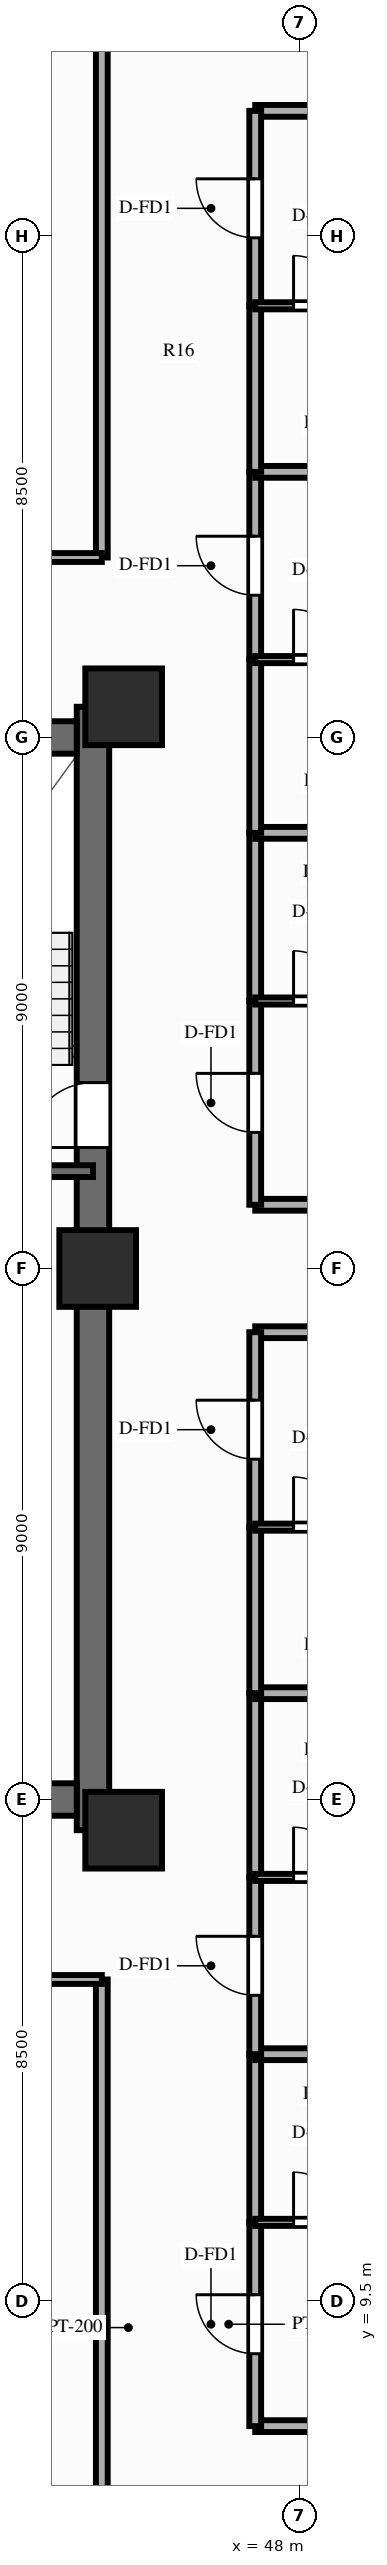
"""IFC4 building model, lengths in metres.
Left out: names, types, materials, properties, quantities, classifications, styles, units other than length and angle.
Written with IfcOpenShell. Run it as: python <this file> out.ifc"""

import sys

from ifc_helpers import new_model, si_unit, direction, frame, frame_2d, origin, origin_2d, place, context, subcontext, project, spatial, rectangle, extrude, source, transform, mapped, element, fill, save


model = new_model("IFC4")
c1 = context("Model", 3, precision=1e-05, world=origin(), true_north=direction((0.0, 1.0)))
c2 = subcontext(c1, "Body", "Model", "MODEL_VIEW")
j1 = project(units=[si_unit("LENGTHUNIT", "METRE"), si_unit("PLANEANGLEUNIT", "RADIAN")], contexts=[c1])
p1 = place(None, origin())
s1 = spatial("IfcSite", under=j1, at=p1, CompositionType="ELEMENT")
p2 = place(p1, origin())
s2 = spatial("IfcBuilding", under=s1, at=p2, CompositionType="ELEMENT")
p3 = place(p2, frame((0.0, 0.0, 92.85)))
s3 = spatial("IfcBuildingStorey", under=s2, at=p3, CompositionType="ELEMENT", Elevation=92.85)
p4 = place(p3, frame((44.5, 17.48, 0.0), z_axis=(0.0, 0.0, 1.0), x_axis=(0.0, 1.0, 0.0)))
e1 = element("IfcWall", 1, at=p4, inside=s3, PredefinedType="SHEAR", context=c2, shape_type="SweptSolid", body=[
    extrude(rectangle(XDim=19.04, YDim=0.55, at=frame_2d((9.52, 0.0))), origin(), (0.0, 0.0, 1.0), 3.0),
])
p5 = place(p4, frame((12.67, 0.0, 0.0), z_axis=(0.0, 0.0, 1.0), x_axis=(-1.0, 0.0, 0.0)))
e2 = element("IfcOpeningElement", 2, at=p5, cuts=e1, PredefinedType="OPENING", context=c2, shape_type="SweptSolid", body=[
    extrude(rectangle(XDim=1.1, YDim=2.15, at=frame_2d((0.55, 1.075))), frame((0.0, 0.287, 0.0), z_axis=(0.0, -1.0, 0.0), x_axis=(1.0, 0.0, 0.0)), (0.0, 0.0, 1.0), 0.574),
])
p6 = place(p3, frame((31.775, 18.0, 0.0), z_axis=(0.0, 0.0, 1.0), x_axis=(1.0, 0.0, 0.0)))
e3 = element("IfcWall", 3, at=p6, inside=s3, PredefinedType="SHEAR", context=c2, shape_type="SweptSolid", body=[
    extrude(rectangle(XDim=12.45, YDim=0.55, at=frame_2d((6.225, 0.0))), origin(), (0.0, 0.0, 1.0), 3.0),
])
p7 = place(p3, frame((31.775, 36.0, 0.0), z_axis=(0.0, 0.0, 1.0), x_axis=(1.0, 0.0, 0.0)))
e4 = element("IfcWall", 4, at=p7, inside=s3, PredefinedType="SHEAR", context=c2, shape_type="SweptSolid", body=[
    extrude(rectangle(XDim=12.45, YDim=0.55, at=frame_2d((6.225, 0.0))), origin(), (0.0, 0.0, 1.0), 3.0),
])
p8 = place(p7, frame((5.175, 0.0, 0.0), z_axis=(0.0, 0.0, 1.0), x_axis=(-1.0, 0.0, 0.0)))
e5 = element("IfcOpeningElement", 5, at=p8, cuts=e4, PredefinedType="OPENING", context=c2, shape_type="SweptSolid", body=[
    extrude(rectangle(XDim=1.4, YDim=2.15, at=frame_2d((0.7, 1.075))), frame((0.0, 0.287, 0.0), z_axis=(0.0, -1.0, 0.0), x_axis=(1.0, 0.0, 0.0)), (0.0, 0.0, 1.0), 0.574),
])
m1 = source(origin(), c2, "Body", "SweptSolid", [
    extrude(rectangle(XDim=1.3, YDim=1.3, at=origin_2d()), origin(), (0.0, 0.0, 1.0), 3.0),
])
for number, where, z_axis, x_axis in (
    (6, (45.02, 17.48, 0.0), (0.0, 0.0, 1.0), (1.0, 0.0, 0.0)),
    (7, (45.02, 36.52, 0.0), (0.0, 0.0, 1.0), (1.0, 0.0, 0.0)),
    (8, (44.58, 27.0, 0.0), (0.0, 0.0, 1.0), (1.0, 0.0, 0.0)),
):
    element("IfcColumn", number, at=place(p3, frame(where, z_axis=z_axis, x_axis=x_axis)), inside=s3, PredefinedType="COLUMN", context=c2, shape_type="MappedRepresentation", body=[
        mapped(m1, transform((0.0, 0.0, 0.0), scale=1.0)),
    ])
p9 = place(p3, frame((40.57, 28.65, 0.0), z_axis=(0.0, 0.0, 1.0), x_axis=(1.0, 0.0, 0.0)))
e9 = element("IfcWall", 9, at=p9, inside=s3, PredefinedType="SOLIDWALL", context=c2, shape_type="SweptSolid", body=[
    extrude(rectangle(XDim=3.93, YDim=0.2, at=frame_2d((1.965, 0.0))), origin(), (0.0, 0.0, 1.0), 2.79),
])
p10 = place(p3, frame((44.65, 14.95, 0.0), z_axis=(0.0, 0.0, 1.0), x_axis=(0.0, -1.0, 0.0)))
e10 = element("IfcWall", 10, at=p10, inside=s3, PredefinedType="PARTITIONING", context=c2, shape_type="SweptSolid", body=[
    extrude(rectangle(XDim=11.8, YDim=0.2, at=frame_2d((5.9, 0.0))), origin(), (0.0, 0.0, 1.0), 2.34),
])
p11 = place(p3, frame((36.25, 14.95, 0.0), z_axis=(0.0, 0.0, 1.0), x_axis=(1.0, 0.0, 0.0)))
e11 = element("IfcWall", 11, at=p11, inside=s3, PredefinedType="PARTITIONING", context=c2, shape_type="SweptSolid", body=[
    extrude(rectangle(XDim=8.4, YDim=0.15, at=frame_2d((4.2, 0.0))), origin(), (0.0, 0.0, 1.0), 2.79),
])
p12 = place(p11, frame((3.367, 0.0, 0.0)))
e12 = element("IfcOpeningElement", 12, at=p12, cuts=e11, PredefinedType="OPENING", context=c2, shape_type="SweptSolid", body=[
    extrude(rectangle(XDim=1.1, YDim=2.15, at=frame_2d((0.55, 1.075))), frame((0.0, 0.087, 0.0), z_axis=(0.0, -1.0, 0.0), x_axis=(1.0, 0.0, 0.0)), (0.0, 0.0, 1.0), 0.174),
])
p13 = place(p3, frame((44.65, 39.05, 0.0), z_axis=(0.0, 0.0, 1.0), x_axis=(0.0, 1.0, 0.0)))
e13 = element("IfcWall", 13, at=p13, inside=s3, PredefinedType="PARTITIONING", context=c2, shape_type="SweptSolid", body=[
    extrude(rectangle(XDim=11.8, YDim=0.2, at=frame_2d((5.9, 0.0))), origin(), (0.0, 0.0, 1.0), 2.34),
])
p14 = place(p3, frame((38.4, 39.05, 0.0), z_axis=(0.0, 0.0, 1.0), x_axis=(1.0, 0.0, 0.0)))
e14 = element("IfcWall", 14, at=p14, inside=s3, PredefinedType="PARTITIONING", context=c2, shape_type="SweptSolid", body=[
    extrude(rectangle(XDim=6.25, YDim=0.15, at=frame_2d((3.125, 0.0))), origin(), (0.0, 0.0, 1.0), 2.79),
])
p15 = place(p14, frame((2.382, 0.0, 0.0)))
e15 = element("IfcOpeningElement", 15, at=p15, cuts=e14, PredefinedType="OPENING", context=c2, shape_type="SweptSolid", body=[
    extrude(rectangle(XDim=1.1, YDim=2.15, at=frame_2d((0.55, 1.075))), frame((0.0, 0.087, 0.0), z_axis=(0.0, -1.0, 0.0), x_axis=(1.0, 0.0, 0.0)), (0.0, 0.0, 1.0), 0.174),
])
for number, where, z_axis, x_axis in (
    (16, (47.25, 7.38, 0.0), (0.0, 0.0, 1.0), (1.0, 0.0, 0.0)),
    (17, (47.25, 25.92, 0.0), (0.0, 0.0, 1.0), (1.0, 0.0, 0.0)),
):
    element("IfcWall", number, at=place(p3, frame(where, z_axis=z_axis, x_axis=x_axis)), inside=s3, PredefinedType="PARTITIONING", context=c2, shape_type="SweptSolid", body=[
        extrude(rectangle(XDim=16.6, YDim=0.2, at=frame_2d((8.3, 0.0))), origin(), (0.0, 0.0, 1.0), 2.79),
    ])
p16 = place(p3, frame((47.25, 7.38, 0.0), z_axis=(0.0, 0.0, 1.0), x_axis=(0.0, 1.0, 0.0)))
e18 = element("IfcWall", 18, at=p16, inside=s3, PredefinedType="PARTITIONING", context=c2, shape_type="SweptSolid", body=[
    extrude(rectangle(XDim=3.454, YDim=0.2, at=frame_2d((1.727, 0.0))), origin(), (0.0, 0.0, 1.0), 2.79),
])
p17 = place(p16, frame((1.227, 0.0, 0.0)))
e19 = element("IfcOpeningElement", 19, at=p17, cuts=e18, PredefinedType="OPENING", context=c2, shape_type="SweptSolid", body=[
    extrude(rectangle(XDim=1.0, YDim=2.15, at=frame_2d((0.5, 1.075))), frame((0.0, 0.112, 0.0), z_axis=(0.0, -1.0, 0.0), x_axis=(1.0, 0.0, 0.0)), (0.0, 0.0, 1.0), 0.224),
])
p18 = place(p3, frame((47.25, 10.833, 0.0), z_axis=(0.0, 0.0, 1.0), x_axis=(0.0, 1.0, 0.0)))
e20 = element("IfcWall", 20, at=p18, inside=s3, PredefinedType="PARTITIONING", context=c2, shape_type="SweptSolid", body=[
    extrude(rectangle(XDim=2.85, YDim=0.2, at=frame_2d((1.425, 0.0))), origin(), (0.0, 0.0, 1.0), 2.79),
])
p19 = place(p3, frame((47.25, 10.833, 0.0), z_axis=(0.0, 0.0, 1.0), x_axis=(1.0, 0.0, 0.0)))
e21 = element("IfcWall", 21, at=p19, inside=s3, PredefinedType="PARTITIONING", context=c2, shape_type="SweptSolid", body=[
    extrude(rectangle(XDim=2.15, YDim=0.12, at=frame_2d((1.075, 0.0))), origin(), (0.0, 0.0, 1.0), 2.79),
])
p20 = place(p19, frame((0.65, 0.0, 0.0)))
e22 = element("IfcOpeningElement", 22, at=p20, cuts=e21, PredefinedType="OPENING", context=c2, shape_type="SweptSolid", body=[
    extrude(rectangle(XDim=0.85, YDim=2.05, at=frame_2d((0.425, 1.025))), frame((0.0, 0.072, 0.0), z_axis=(0.0, -1.0, 0.0), x_axis=(1.0, 0.0, 0.0)), (0.0, 0.0, 1.0), 0.144),
])
p21 = place(p3, frame((47.25, 13.684, 0.0), z_axis=(0.0, 0.0, 1.0), x_axis=(1.0, 0.0, 0.0)))
e23 = element("IfcWall", 23, at=p21, inside=s3, PredefinedType="PARTITIONING", context=c2, shape_type="SweptSolid", body=[
    extrude(rectangle(XDim=16.6, YDim=0.2, at=frame_2d((8.3, 0.0))), origin(), (0.0, 0.0, 1.0), 2.79),
])
p22 = place(p3, frame((47.25, 13.684, 0.0), z_axis=(0.0, 0.0, 1.0), x_axis=(0.0, 1.0, 0.0)))
e24 = element("IfcWall", 24, at=p22, inside=s3, PredefinedType="PARTITIONING", context=c2, shape_type="SweptSolid", body=[
    extrude(rectangle(XDim=2.996, YDim=0.2, at=frame_2d((1.498, 0.0))), origin(), (0.0, 0.0, 1.0), 2.79),
])
p23 = place(p22, frame((0.998, 0.0, 0.0)))
e25 = element("IfcOpeningElement", 25, at=p23, cuts=e24, PredefinedType="OPENING", context=c2, shape_type="SweptSolid", body=[
    extrude(rectangle(XDim=1.0, YDim=2.15, at=frame_2d((0.5, 1.075))), frame((0.0, 0.112, 0.0), z_axis=(0.0, -1.0, 0.0), x_axis=(1.0, 0.0, 0.0)), (0.0, 0.0, 1.0), 0.224),
])
p24 = place(p3, frame((47.25, 16.68, 0.0), z_axis=(0.0, 0.0, 1.0), x_axis=(0.0, 1.0, 0.0)))
e26 = element("IfcWall", 26, at=p24, inside=s3, PredefinedType="PARTITIONING", context=c2, shape_type="SweptSolid", body=[
    extrude(rectangle(XDim=3.122, YDim=0.2, at=frame_2d((1.561, 0.0))), origin(), (0.0, 0.0, 1.0), 2.79),
])
p25 = place(p3, frame((47.25, 16.68, 0.0), z_axis=(0.0, 0.0, 1.0), x_axis=(1.0, 0.0, 0.0)))
e27 = element("IfcWall", 27, at=p25, inside=s3, PredefinedType="PARTITIONING", context=c2, shape_type="SweptSolid", body=[
    extrude(rectangle(XDim=2.15, YDim=0.12, at=frame_2d((1.075, 0.0))), origin(), (0.0, 0.0, 1.0), 2.79),
])
p26 = place(p25, frame((0.65, 0.0, 0.0)))
e28 = element("IfcOpeningElement", 28, at=p26, cuts=e27, PredefinedType="OPENING", context=c2, shape_type="SweptSolid", body=[
    extrude(rectangle(XDim=0.85, YDim=2.05, at=frame_2d((0.425, 1.025))), frame((0.0, 0.072, 0.0), z_axis=(0.0, -1.0, 0.0), x_axis=(1.0, 0.0, 0.0)), (0.0, 0.0, 1.0), 0.144),
])
p27 = place(p3, frame((47.25, 19.802, 0.0), z_axis=(0.0, 0.0, 1.0), x_axis=(1.0, 0.0, 0.0)))
e29 = element("IfcWall", 29, at=p27, inside=s3, PredefinedType="PARTITIONING", context=c2, shape_type="SweptSolid", body=[
    extrude(rectangle(XDim=16.6, YDim=0.2, at=frame_2d((8.3, 0.0))), origin(), (0.0, 0.0, 1.0), 2.79),
])
p28 = place(p3, frame((47.25, 19.802, 0.0), z_axis=(0.0, 0.0, 1.0), x_axis=(0.0, 1.0, 0.0)))
e30 = element("IfcWall", 30, at=p28, inside=s3, PredefinedType="PARTITIONING", context=c2, shape_type="SweptSolid", body=[
    extrude(rectangle(XDim=2.814, YDim=0.2, at=frame_2d((1.407, 0.0))), origin(), (0.0, 0.0, 1.0), 2.79),
])
p29 = place(p3, frame((47.25, 22.616, 0.0), z_axis=(0.0, 0.0, 1.0), x_axis=(0.0, 1.0, 0.0)))
e31 = element("IfcWall", 31, at=p29, inside=s3, PredefinedType="PARTITIONING", context=c2, shape_type="SweptSolid", body=[
    extrude(rectangle(XDim=3.304, YDim=0.2, at=frame_2d((1.652, 0.0))), origin(), (0.0, 0.0, 1.0), 2.79),
])
p30 = place(p29, frame((1.152, 0.0, 0.0)))
e32 = element("IfcOpeningElement", 32, at=p30, cuts=e31, PredefinedType="OPENING", context=c2, shape_type="SweptSolid", body=[
    extrude(rectangle(XDim=1.0, YDim=2.15, at=frame_2d((0.5, 1.075))), frame((0.0, 0.112, 0.0), z_axis=(0.0, -1.0, 0.0), x_axis=(1.0, 0.0, 0.0)), (0.0, 0.0, 1.0), 0.224),
])
p31 = place(p3, frame((47.25, 22.616, 0.0), z_axis=(0.0, 0.0, 1.0), x_axis=(1.0, 0.0, 0.0)))
e33 = element("IfcWall", 33, at=p31, inside=s3, PredefinedType="PARTITIONING", context=c2, shape_type="SweptSolid", body=[
    extrude(rectangle(XDim=2.15, YDim=0.12, at=frame_2d((1.075, 0.0))), origin(), (0.0, 0.0, 1.0), 2.79),
])
p32 = place(p31, frame((0.65, 0.0, 0.0)))
e34 = element("IfcOpeningElement", 34, at=p32, cuts=e33, PredefinedType="OPENING", context=c2, shape_type="SweptSolid", body=[
    extrude(rectangle(XDim=0.85, YDim=2.05, at=frame_2d((0.425, 1.025))), frame((0.0, 0.072, 0.0), z_axis=(0.0, -1.0, 0.0), x_axis=(1.0, 0.0, 0.0)), (0.0, 0.0, 1.0), 0.144),
])
for number, where, z_axis, x_axis in (
    (35, (47.25, 28.08, 0.0), (0.0, 0.0, 1.0), (1.0, 0.0, 0.0)),
    (36, (47.25, 46.62, 0.0), (0.0, 0.0, 1.0), (1.0, 0.0, 0.0)),
):
    element("IfcWall", number, at=place(p3, frame(where, z_axis=z_axis, x_axis=x_axis)), inside=s3, PredefinedType="PARTITIONING", context=c2, shape_type="SweptSolid", body=[
        extrude(rectangle(XDim=16.6, YDim=0.2, at=frame_2d((8.3, 0.0))), origin(), (0.0, 0.0, 1.0), 2.79),
    ])
p33 = place(p3, frame((47.25, 28.08, 0.0), z_axis=(0.0, 0.0, 1.0), x_axis=(0.0, 1.0, 0.0)))
e37 = element("IfcWall", 37, at=p33, inside=s3, PredefinedType="PARTITIONING", context=c2, shape_type="SweptSolid", body=[
    extrude(rectangle(XDim=3.454, YDim=0.2, at=frame_2d((1.727, 0.0))), origin(), (0.0, 0.0, 1.0), 2.79),
])
p34 = place(p33, frame((1.227, 0.0, 0.0)))
e38 = element("IfcOpeningElement", 38, at=p34, cuts=e37, PredefinedType="OPENING", context=c2, shape_type="SweptSolid", body=[
    extrude(rectangle(XDim=1.0, YDim=2.15, at=frame_2d((0.5, 1.075))), frame((0.0, 0.112, 0.0), z_axis=(0.0, -1.0, 0.0), x_axis=(1.0, 0.0, 0.0)), (0.0, 0.0, 1.0), 0.224),
])
p35 = place(p3, frame((47.25, 31.534, 0.0), z_axis=(0.0, 0.0, 1.0), x_axis=(0.0, 1.0, 0.0)))
e39 = element("IfcWall", 39, at=p35, inside=s3, PredefinedType="PARTITIONING", context=c2, shape_type="SweptSolid", body=[
    extrude(rectangle(XDim=2.85, YDim=0.2, at=frame_2d((1.425, 0.0))), origin(), (0.0, 0.0, 1.0), 2.79),
])
p36 = place(p3, frame((47.25, 31.534, 0.0), z_axis=(0.0, 0.0, 1.0), x_axis=(1.0, 0.0, 0.0)))
e40 = element("IfcWall", 40, at=p36, inside=s3, PredefinedType="PARTITIONING", context=c2, shape_type="SweptSolid", body=[
    extrude(rectangle(XDim=2.15, YDim=0.12, at=frame_2d((1.075, 0.0))), origin(), (0.0, 0.0, 1.0), 2.79),
])
p37 = place(p36, frame((0.65, 0.0, 0.0)))
e41 = element("IfcOpeningElement", 41, at=p37, cuts=e40, PredefinedType="OPENING", context=c2, shape_type="SweptSolid", body=[
    extrude(rectangle(XDim=0.85, YDim=2.05, at=frame_2d((0.425, 1.025))), frame((0.0, 0.072, 0.0), z_axis=(0.0, -1.0, 0.0), x_axis=(1.0, 0.0, 0.0)), (0.0, 0.0, 1.0), 0.144),
])
p38 = place(p3, frame((47.25, 34.384, 0.0), z_axis=(0.0, 0.0, 1.0), x_axis=(1.0, 0.0, 0.0)))
e42 = element("IfcWall", 42, at=p38, inside=s3, PredefinedType="PARTITIONING", context=c2, shape_type="SweptSolid", body=[
    extrude(rectangle(XDim=16.6, YDim=0.2, at=frame_2d((8.3, 0.0))), origin(), (0.0, 0.0, 1.0), 2.79),
])
p39 = place(p3, frame((47.25, 34.384, 0.0), z_axis=(0.0, 0.0, 1.0), x_axis=(0.0, 1.0, 0.0)))
e43 = element("IfcWall", 43, at=p39, inside=s3, PredefinedType="PARTITIONING", context=c2, shape_type="SweptSolid", body=[
    extrude(rectangle(XDim=2.937, YDim=0.2, at=frame_2d((1.468, 0.0))), origin(), (0.0, 0.0, 1.0), 2.79),
])
p40 = place(p3, frame((47.25, 37.32, 0.0), z_axis=(0.0, 0.0, 1.0), x_axis=(0.0, 1.0, 0.0)))
e44 = element("IfcWall", 44, at=p40, inside=s3, PredefinedType="PARTITIONING", context=c2, shape_type="SweptSolid", body=[
    extrude(rectangle(XDim=3.182, YDim=0.2, at=frame_2d((1.591, 0.0))), origin(), (0.0, 0.0, 1.0), 2.79),
])
p41 = place(p40, frame((1.091, 0.0, 0.0)))
e45 = element("IfcOpeningElement", 45, at=p41, cuts=e44, PredefinedType="OPENING", context=c2, shape_type="SweptSolid", body=[
    extrude(rectangle(XDim=1.0, YDim=2.15, at=frame_2d((0.5, 1.075))), frame((0.0, 0.112, 0.0), z_axis=(0.0, -1.0, 0.0), x_axis=(1.0, 0.0, 0.0)), (0.0, 0.0, 1.0), 0.224),
])
p42 = place(p3, frame((47.25, 37.32, 0.0), z_axis=(0.0, 0.0, 1.0), x_axis=(1.0, 0.0, 0.0)))
e46 = element("IfcWall", 46, at=p42, inside=s3, PredefinedType="PARTITIONING", context=c2, shape_type="SweptSolid", body=[
    extrude(rectangle(XDim=2.15, YDim=0.12, at=frame_2d((1.075, 0.0))), origin(), (0.0, 0.0, 1.0), 2.79),
])
p43 = place(p42, frame((0.65, 0.0, 0.0)))
e47 = element("IfcOpeningElement", 47, at=p43, cuts=e46, PredefinedType="OPENING", context=c2, shape_type="SweptSolid", body=[
    extrude(rectangle(XDim=0.85, YDim=2.05, at=frame_2d((0.425, 1.025))), frame((0.0, 0.072, 0.0), z_axis=(0.0, -1.0, 0.0), x_axis=(1.0, 0.0, 0.0)), (0.0, 0.0, 1.0), 0.144),
])
p44 = place(p3, frame((47.25, 40.502, 0.0), z_axis=(0.0, 0.0, 1.0), x_axis=(1.0, 0.0, 0.0)))
e48 = element("IfcWall", 48, at=p44, inside=s3, PredefinedType="PARTITIONING", context=c2, shape_type="SweptSolid", body=[
    extrude(rectangle(XDim=16.6, YDim=0.2, at=frame_2d((8.3, 0.0))), origin(), (0.0, 0.0, 1.0), 2.79),
])
p45 = place(p3, frame((47.25, 40.502, 0.0), z_axis=(0.0, 0.0, 1.0), x_axis=(0.0, 1.0, 0.0)))
e49 = element("IfcWall", 49, at=p45, inside=s3, PredefinedType="PARTITIONING", context=c2, shape_type="SweptSolid", body=[
    extrude(rectangle(XDim=2.814, YDim=0.2, at=frame_2d((1.407, 0.0))), origin(), (0.0, 0.0, 1.0), 2.79),
])
p46 = place(p3, frame((47.25, 43.316, 0.0), z_axis=(0.0, 0.0, 1.0), x_axis=(0.0, 1.0, 0.0)))
e50 = element("IfcWall", 50, at=p46, inside=s3, PredefinedType="PARTITIONING", context=c2, shape_type="SweptSolid", body=[
    extrude(rectangle(XDim=3.304, YDim=0.2, at=frame_2d((1.652, 0.0))), origin(), (0.0, 0.0, 1.0), 2.79),
])
p47 = place(p46, frame((1.152, 0.0, 0.0)))
e51 = element("IfcOpeningElement", 51, at=p47, cuts=e50, PredefinedType="OPENING", context=c2, shape_type="SweptSolid", body=[
    extrude(rectangle(XDim=1.0, YDim=2.15, at=frame_2d((0.5, 1.075))), frame((0.0, 0.112, 0.0), z_axis=(0.0, -1.0, 0.0), x_axis=(1.0, 0.0, 0.0)), (0.0, 0.0, 1.0), 0.224),
])
p48 = place(p3, frame((47.25, 43.316, 0.0), z_axis=(0.0, 0.0, 1.0), x_axis=(1.0, 0.0, 0.0)))
e52 = element("IfcWall", 52, at=p48, inside=s3, PredefinedType="PARTITIONING", context=c2, shape_type="SweptSolid", body=[
    extrude(rectangle(XDim=2.15, YDim=0.12, at=frame_2d((1.075, 0.0))), origin(), (0.0, 0.0, 1.0), 2.79),
])
p49 = place(p48, frame((0.65, 0.0, 0.0)))
e53 = element("IfcOpeningElement", 53, at=p49, cuts=e52, PredefinedType="OPENING", context=c2, shape_type="SweptSolid", body=[
    extrude(rectangle(XDim=0.85, YDim=2.05, at=frame_2d((0.425, 1.025))), frame((0.0, 0.072, 0.0), z_axis=(0.0, -1.0, 0.0), x_axis=(1.0, 0.0, 0.0)), (0.0, 0.0, 1.0), 0.144),
])
m2 = source(origin(), c2, "Body", "SweptSolid", [
    extrude(rectangle(XDim=1.1, YDim=2.15, at=frame_2d((0.55, 1.075))), frame((0.0, 0.025, 0.0), z_axis=(0.0, -1.0, 0.0), x_axis=(1.0, 0.0, 0.0)), (0.0, 0.0, 1.0), 0.05),
])
p50 = place(p5, origin())
e54 = element("IfcDoor", 54, at=p50, inside=s3, OperationType="SINGLE_SWING_RIGHT", PredefinedType="DOOR", context=c2, shape_type="MappedRepresentation", body=[
    mapped(m2, transform((0.0, 0.0, 0.0), scale=1.0)),
])
fill(e2, e54)
m3 = source(origin(), c2, "Body", "SweptSolid", [
    extrude(rectangle(XDim=1.0, YDim=2.15, at=frame_2d((0.5, 1.075))), frame((0.0, 0.025, 0.0), z_axis=(0.0, -1.0, 0.0), x_axis=(1.0, 0.0, 0.0)), (0.0, 0.0, 1.0), 0.05),
])
p51 = place(p17, origin())
e55 = element("IfcDoor", 55, at=p51, inside=s3, OperationType="SINGLE_SWING_RIGHT", PredefinedType="DOOR", context=c2, shape_type="MappedRepresentation", body=[
    mapped(m3, transform((0.0, 0.0, 0.0), scale=1.0)),
])
fill(e19, e55)
m4 = source(origin(), c2, "Body", "SweptSolid", [
    extrude(rectangle(XDim=0.85, YDim=2.05, at=frame_2d((0.425, 1.025))), frame((0.0, 0.025, 0.0), z_axis=(0.0, -1.0, 0.0), x_axis=(1.0, 0.0, 0.0)), (0.0, 0.0, 1.0), 0.05),
])
p52 = place(p20, origin())
e56 = element("IfcDoor", 56, at=p52, inside=s3, OperationType="SINGLE_SWING_LEFT", PredefinedType="DOOR", context=c2, shape_type="MappedRepresentation", body=[
    mapped(m4, transform((0.0, 0.0, 0.0), scale=1.0)),
])
fill(e22, e56)
p53 = place(p23, origin())
e57 = element("IfcDoor", 57, at=p53, inside=s3, OperationType="SINGLE_SWING_RIGHT", PredefinedType="DOOR", context=c2, shape_type="MappedRepresentation", body=[
    mapped(m3, transform((0.0, 0.0, 0.0), scale=1.0)),
])
fill(e25, e57)
p54 = place(p26, origin())
e58 = element("IfcDoor", 58, at=p54, inside=s3, OperationType="SINGLE_SWING_LEFT", PredefinedType="DOOR", context=c2, shape_type="MappedRepresentation", body=[
    mapped(m4, transform((0.0, 0.0, 0.0), scale=1.0)),
])
fill(e28, e58)
p55 = place(p30, origin())
e59 = element("IfcDoor", 59, at=p55, inside=s3, OperationType="SINGLE_SWING_RIGHT", PredefinedType="DOOR", context=c2, shape_type="MappedRepresentation", body=[
    mapped(m3, transform((0.0, 0.0, 0.0), scale=1.0)),
])
fill(e32, e59)
p56 = place(p32, origin())
e60 = element("IfcDoor", 60, at=p56, inside=s3, OperationType="SINGLE_SWING_LEFT", PredefinedType="DOOR", context=c2, shape_type="MappedRepresentation", body=[
    mapped(m4, transform((0.0, 0.0, 0.0), scale=1.0)),
])
fill(e34, e60)
p57 = place(p34, origin())
e61 = element("IfcDoor", 61, at=p57, inside=s3, OperationType="SINGLE_SWING_RIGHT", PredefinedType="DOOR", context=c2, shape_type="MappedRepresentation", body=[
    mapped(m3, transform((0.0, 0.0, 0.0), scale=1.0)),
])
fill(e38, e61)
p58 = place(p37, origin())
e62 = element("IfcDoor", 62, at=p58, inside=s3, OperationType="SINGLE_SWING_LEFT", PredefinedType="DOOR", context=c2, shape_type="MappedRepresentation", body=[
    mapped(m4, transform((0.0, 0.0, 0.0), scale=1.0)),
])
fill(e41, e62)
p59 = place(p41, origin())
e63 = element("IfcDoor", 63, at=p59, inside=s3, OperationType="SINGLE_SWING_RIGHT", PredefinedType="DOOR", context=c2, shape_type="MappedRepresentation", body=[
    mapped(m3, transform((0.0, 0.0, 0.0), scale=1.0)),
])
fill(e45, e63)
p60 = place(p43, origin())
e64 = element("IfcDoor", 64, at=p60, inside=s3, OperationType="SINGLE_SWING_LEFT", PredefinedType="DOOR", context=c2, shape_type="MappedRepresentation", body=[
    mapped(m4, transform((0.0, 0.0, 0.0), scale=1.0)),
])
fill(e47, e64)
p61 = place(p47, origin())
e65 = element("IfcDoor", 65, at=p61, inside=s3, OperationType="SINGLE_SWING_RIGHT", PredefinedType="DOOR", context=c2, shape_type="MappedRepresentation", body=[
    mapped(m3, transform((0.0, 0.0, 0.0), scale=1.0)),
])
fill(e51, e65)
p62 = place(p49, origin())
e66 = element("IfcDoor", 66, at=p62, inside=s3, OperationType="SINGLE_SWING_LEFT", PredefinedType="DOOR", context=c2, shape_type="MappedRepresentation", body=[
    mapped(m4, transform((0.0, 0.0, 0.0), scale=1.0)),
])
fill(e53, e66)
save(model, sys.argv[1])
